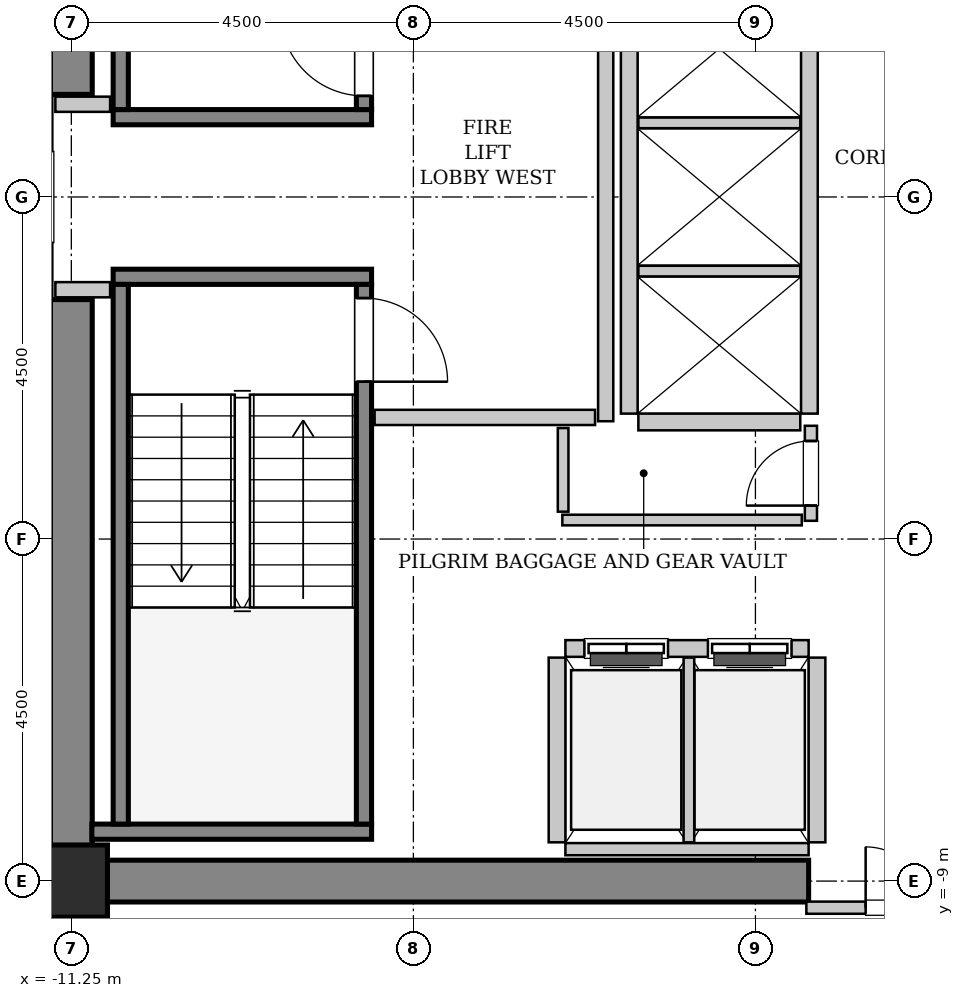
"""IFC4 building model, lengths in metres.
Left out: names, types, materials, properties, quantities, classifications, styles, units other than length and angle.
Written with IfcOpenShell. Run it as: python <this file> out.ifc"""

import sys

from ifc_helpers import new_model, si_unit, direction, frame, frame_2d, origin, origin_2d, place, context, subcontext, project, spatial, rectangle, hollow_rectangle, extrude, source, transform, mapped, element, fill, save


model = new_model("IFC4")
c1 = context("Model", 3, precision=1e-05, world=origin(), true_north=direction((0.0, 1.0)))
c2 = subcontext(c1, "Body", "Model", "MODEL_VIEW")
j1 = project(units=[si_unit("LENGTHUNIT", "METRE"), si_unit("PLANEANGLEUNIT", "RADIAN")], contexts=[c1])
p1 = place(None, origin())
s1 = spatial("IfcSite", under=j1, at=p1, CompositionType="ELEMENT")
p2 = place(p1, origin())
s2 = spatial("IfcBuilding", under=s1, at=p2, CompositionType="ELEMENT")
p3 = place(p2, frame((0.0, 0.0, 164.0)))
s3 = spatial("IfcBuildingStorey", under=s2, at=p3, CompositionType="ELEMENT", Elevation=164.0)
m1 = source(origin(), c2, "Body", "SweptSolid", [
    extrude(rectangle(XDim=9.975, YDim=0.55, at=frame_2d((4.987, 0.0))), origin(), (0.0, 0.0, 1.0), 3.8),
])
p4 = place(p3, frame((-11.525, -9.0, 0.0), z_axis=(0.0, 0.0, 1.0), x_axis=(1.0, 0.0, 0.0)))
e1 = element("IfcWall", 1, at=p4, inside=s3, PredefinedType="SHEAR", context=c2, shape_type="MappedRepresentation", body=[
    mapped(m1, transform((0.0, 0.0, 0.0), x_axis=(1.0, 0.0, 0.0), y_axis=(0.0, 1.0, 0.0), z_axis=(0.0, 0.0, 1.0), scale=1.0)),
])
m2 = source(origin(), c2, "Body", "SweptSolid", [
    extrude(rectangle(XDim=7.375, YDim=0.55, at=frame_2d((3.688, 0.0))), origin(), (0.0, 0.0, 1.0), 3.8),
])
for number, where, z_axis, x_axis in (
    (2, (-11.25, -8.725, 0.0), (0.0, 0.0, 1.0), (0.0, 1.0, 0.0)),
    (3, (-11.25, 1.35, 0.0), (0.0, 0.0, 1.0), (0.0, 1.0, 0.0)),
):
    element("IfcWall", number, at=place(p3, frame(where, z_axis=z_axis, x_axis=x_axis)), inside=s3, PredefinedType="SHEAR", context=c2, shape_type="MappedRepresentation", body=[
        mapped(m2, transform((0.0, 0.0, 0.0), x_axis=(1.0, 0.0, 0.0), y_axis=(0.0, 1.0, 0.0), z_axis=(0.0, 0.0, 1.0), scale=1.0)),
    ])
m3 = source(origin(), c2, "Body", "SweptSolid", [
    extrude(hollow_rectangle(XDim=0.95, YDim=0.95, WallThickness=0.045, InnerFilletRadius=0.045, OuterFilletRadius=0.09, at=origin_2d()), origin(), (0.0, 0.0, 1.0), 3.8),
])
p5 = place(p3, frame((-11.25, -9.0, 0.0), z_axis=(0.0, 0.0, 1.0), x_axis=(1.0, 0.0, 0.0)))
e4 = element("IfcColumn", 4, at=p5, inside=s3, PredefinedType="COLUMN", context=c2, shape_type="MappedRepresentation", body=[
    mapped(m3, transform((0.0, 0.0, 0.0), x_axis=(1.0, 0.0, 0.0), y_axis=(0.0, 1.0, 0.0), z_axis=(0.0, 0.0, 1.0), scale=1.0)),
])
m4 = source(origin(), c2, "Body", "SweptSolid", [
    extrude(rectangle(XDim=3.4, YDim=0.2, at=frame_2d((1.7, 0.0))), origin(), (0.0, 0.0, 1.0), 3.8),
])
p6 = place(p3, frame((-7.3, 1.05, 0.0), z_axis=(0.0, 0.0, 1.0), x_axis=(-1.0, 0.0, 0.0)))
e5 = element("IfcWall", 5, at=p6, inside=s3, PredefinedType="SOLIDWALL", context=c2, shape_type="MappedRepresentation", body=[
    mapped(m4, transform((0.0, 0.0, 0.0), x_axis=(1.0, 0.0, 0.0), y_axis=(0.0, 1.0, 0.0), z_axis=(0.0, 0.0, 1.0), scale=1.0)),
])
m5 = source(origin(), c2, "Body", "SweptSolid", [
    extrude(rectangle(XDim=7.1, YDim=0.2, at=frame_2d((3.55, 0.0))), origin(), (0.0, 0.0, 1.0), 3.8),
])
p7 = place(p3, frame((-7.4, 1.15, 0.0), z_axis=(0.0, 0.0, 1.0), x_axis=(0.0, 1.0, 0.0)))
e6 = element("IfcWall", 6, at=p7, inside=s3, PredefinedType="SOLIDWALL", context=c2, shape_type="MappedRepresentation", body=[
    mapped(m5, transform((0.0, 0.0, 0.0), x_axis=(1.0, 0.0, 0.0), y_axis=(0.0, 1.0, 0.0), z_axis=(0.0, 0.0, 1.0), scale=1.0)),
])
p8 = place(p7, frame((0.18, 0.0, 0.0)))
e7 = element("IfcOpeningElement", 7, at=p8, cuts=e6, PredefinedType="OPENING", context=c2, shape_type="SweptSolid", body=[
    extrude(rectangle(XDim=1.1, YDim=2.15, at=frame_2d((0.55, 1.075))), frame((0.0, 0.11, 0.0), z_axis=(0.0, -1.0, 0.0), x_axis=(1.0, 0.0, 0.0)), (0.0, 0.0, 1.0), 0.22),
])
p9 = place(p3, frame((-10.6, 1.15, 0.0), z_axis=(0.0, 0.0, 1.0), x_axis=(0.0, 1.0, 0.0)))
e8 = element("IfcWall", 8, at=p9, inside=s3, PredefinedType="SOLIDWALL", context=c2, shape_type="MappedRepresentation", body=[
    mapped(m5, transform((0.0, 0.0, 0.0), x_axis=(1.0, 0.0, 0.0), y_axis=(0.0, 1.0, 0.0), z_axis=(0.0, 0.0, 1.0), scale=1.0)),
])
p10 = place(p3, frame((-10.7, -1.05, 0.0), z_axis=(0.0, 0.0, 1.0), x_axis=(1.0, 0.0, 0.0)))
e9 = element("IfcWall", 9, at=p10, inside=s3, PredefinedType="SOLIDWALL", context=c2, shape_type="MappedRepresentation", body=[
    mapped(m4, transform((0.0, 0.0, 0.0), x_axis=(1.0, 0.0, 0.0), y_axis=(0.0, 1.0, 0.0), z_axis=(0.0, 0.0, 1.0), scale=1.0)),
])
m6 = source(origin(), c2, "Body", "SweptSolid", [
    extrude(rectangle(XDim=3.68, YDim=0.2, at=frame_2d((1.84, 0.0))), origin(), (0.0, 0.0, 1.0), 3.8),
])
p11 = place(p3, frame((-10.98, -8.35, 0.0), z_axis=(0.0, 0.0, 1.0), x_axis=(1.0, 0.0, 0.0)))
e10 = element("IfcWall", 10, at=p11, inside=s3, PredefinedType="SOLIDWALL", context=c2, shape_type="MappedRepresentation", body=[
    mapped(m6, transform((0.0, 0.0, 0.0), x_axis=(1.0, 0.0, 0.0), y_axis=(0.0, 1.0, 0.0), z_axis=(0.0, 0.0, 1.0), scale=1.0)),
])
p12 = place(p3, frame((-10.6, -1.15, 0.0), z_axis=(0.0, 0.0, 1.0), x_axis=(0.0, -1.0, 0.0)))
e11 = element("IfcWall", 11, at=p12, inside=s3, PredefinedType="SOLIDWALL", context=c2, shape_type="MappedRepresentation", body=[
    mapped(m5, transform((0.0, 0.0, 0.0), x_axis=(1.0, 0.0, 0.0), y_axis=(0.0, 1.0, 0.0), z_axis=(0.0, 0.0, 1.0), scale=1.0)),
])
p13 = place(p3, frame((-7.4, -1.15, 0.0), z_axis=(0.0, 0.0, 1.0), x_axis=(0.0, -1.0, 0.0)))
e12 = element("IfcWall", 12, at=p13, inside=s3, PredefinedType="SOLIDWALL", context=c2, shape_type="MappedRepresentation", body=[
    mapped(m5, transform((0.0, 0.0, 0.0), x_axis=(1.0, 0.0, 0.0), y_axis=(0.0, 1.0, 0.0), z_axis=(0.0, 0.0, 1.0), scale=1.0)),
])
p14 = place(p13, frame((0.18, 0.0, 0.0)))
e13 = element("IfcOpeningElement", 13, at=p14, cuts=e12, PredefinedType="OPENING", context=c2, shape_type="SweptSolid", body=[
    extrude(rectangle(XDim=1.1, YDim=2.15, at=frame_2d((0.55, 1.075))), frame((0.0, 0.11, 0.0), z_axis=(0.0, -1.0, 0.0), x_axis=(1.0, 0.0, 0.0)), (0.0, 0.0, 1.0), 0.22),
])
m7 = source(origin(), c2, "Body", "SweptSolid", [
    extrude(rectangle(XDim=3.2, YDim=0.22, at=frame_2d((1.6, 0.0))), origin(), (0.0, 0.0, 1.0), 3.535),
])
p15 = place(p3, frame((-1.55, -5.94, 0.0), z_axis=(0.0, 0.0, 1.0), x_axis=(-1.0, 0.0, 0.0)))
e14 = element("IfcWall", 14, at=p15, inside=s3, PredefinedType="SOLIDWALL", context=c2, shape_type="MappedRepresentation", body=[
    mapped(m7, transform((0.0, 0.0, 0.0), x_axis=(1.0, 0.0, 0.0), y_axis=(0.0, 1.0, 0.0), z_axis=(0.0, 0.0, 1.0), scale=1.0)),
])
p16 = place(p15, frame((1.85, 0.0, 0.0)))
e15 = element("IfcOpeningElement", 15, at=p16, cuts=e14, PredefinedType="OPENING", context=c2, shape_type="SweptSolid", body=[
    extrude(rectangle(XDim=1.1, YDim=2.2, at=frame_2d((0.55, 1.1))), frame((0.0, 0.12, 0.0), z_axis=(0.0, -1.0, 0.0), x_axis=(1.0, 0.0, 0.0)), (0.0, 0.0, 1.0), 0.24),
])
p17 = place(p15, frame((0.225, 0.0, 0.0)))
e16 = element("IfcOpeningElement", 16, at=p17, cuts=e14, PredefinedType="OPENING", context=c2, shape_type="SweptSolid", body=[
    extrude(rectangle(XDim=1.1, YDim=2.2, at=frame_2d((0.55, 1.1))), frame((0.0, 0.12, 0.0), z_axis=(0.0, -1.0, 0.0), x_axis=(1.0, 0.0, 0.0)), (0.0, 0.0, 1.0), 0.24),
])
m8 = source(origin(), c2, "Body", "SweptSolid", [
    extrude(rectangle(XDim=3.2, YDim=0.16, at=frame_2d((1.6, 0.0))), origin(), (0.0, 0.0, 1.0), 2.425),
])
p18 = place(p3, frame((-4.75, -8.58, 0.0), z_axis=(0.0, 0.0, 1.0), x_axis=(1.0, 0.0, 0.0)))
e17 = element("IfcWall", 17, at=p18, inside=s3, PredefinedType="PARTITIONING", context=c2, shape_type="MappedRepresentation", body=[
    mapped(m8, transform((0.0, 0.0, 0.0), x_axis=(1.0, 0.0, 0.0), y_axis=(0.0, 1.0, 0.0), z_axis=(0.0, 0.0, 1.0), scale=1.0)),
])
m9 = source(origin(), c2, "Body", "SweptSolid", [
    extrude(rectangle(XDim=2.43, YDim=0.22, at=frame_2d((1.215, 0.0))), origin(), (0.0, 0.0, 1.0), 3.535),
])
p19 = place(p3, frame((-4.86, -6.06, 0.0), z_axis=(0.0, 0.0, 1.0), x_axis=(0.0, -1.0, 0.0)))
e18 = element("IfcWall", 18, at=p19, inside=s3, PredefinedType="SOLIDWALL", context=c2, shape_type="MappedRepresentation", body=[
    mapped(m9, transform((0.0, 0.0, 0.0), x_axis=(1.0, 0.0, 0.0), y_axis=(0.0, 1.0, 0.0), z_axis=(0.0, 0.0, 1.0), scale=1.0)),
])
m10 = source(origin(), c2, "Body", "SweptSolid", [
    extrude(rectangle(XDim=2.43, YDim=0.14, at=frame_2d((1.215, 0.0))), origin(), (0.0, 0.0, 1.0), 3.535),
])
p20 = place(p3, frame((-3.125, -8.49, 0.0), z_axis=(0.0, 0.0, 1.0), x_axis=(0.0, 1.0, 0.0)))
e19 = element("IfcWall", 19, at=p20, inside=s3, PredefinedType="PARTITIONING", context=c2, shape_type="MappedRepresentation", body=[
    mapped(m10, transform((0.0, 0.0, 0.0), x_axis=(1.0, 0.0, 0.0), y_axis=(0.0, 1.0, 0.0), z_axis=(0.0, 0.0, 1.0), scale=1.0)),
])
p21 = place(p3, frame((-1.44, -8.49, 0.0), z_axis=(0.0, 0.0, 1.0), x_axis=(0.0, 1.0, 0.0)))
e20 = element("IfcWall", 20, at=p21, inside=s3, PredefinedType="SOLIDWALL", context=c2, shape_type="MappedRepresentation", body=[
    mapped(m9, transform((0.0, 0.0, 0.0), x_axis=(1.0, 0.0, 0.0), y_axis=(0.0, 1.0, 0.0), z_axis=(0.0, 0.0, 1.0), scale=1.0)),
])
m11 = source(origin(), c2, "Body", "SweptSolid", [
    extrude(rectangle(XDim=5.7, YDim=0.22, at=frame_2d((2.85, 0.0))), origin(), (0.0, 0.0, 1.0), 3.535),
])
for number, where, z_axis, x_axis in (
    (21, (-1.54, -2.85, 0.0), (0.0, 0.0, 1.0), (0.0, 1.0, 0.0)),
    (22, (-3.91, 2.85, 0.0), (0.0, 0.0, 1.0), (0.0, -1.0, 0.0)),
):
    element("IfcWall", number, at=place(p3, frame(where, z_axis=z_axis, x_axis=x_axis)), inside=s3, PredefinedType="SOLIDWALL", context=c2, shape_type="MappedRepresentation", body=[
        mapped(m11, transform((0.0, 0.0, 0.0), x_axis=(1.0, 0.0, 0.0), y_axis=(0.0, 1.0, 0.0), z_axis=(0.0, 0.0, 1.0), scale=1.0)),
    ])
m12 = source(origin(), c2, "Body", "SweptSolid", [
    extrude(rectangle(XDim=2.13, YDim=0.22, at=frame_2d((1.065, 0.0))), origin(), (0.0, 0.0, 1.0), 3.535),
])
p22 = place(p3, frame((-3.79, -2.96, 0.0), z_axis=(0.0, 0.0, 1.0), x_axis=(1.0, 0.0, 0.0)))
e23 = element("IfcWall", 23, at=p22, inside=s3, PredefinedType="SOLIDWALL", context=c2, shape_type="MappedRepresentation", body=[
    mapped(m12, transform((0.0, 0.0, 0.0), x_axis=(1.0, 0.0, 0.0), y_axis=(0.0, 1.0, 0.0), z_axis=(0.0, 0.0, 1.0), scale=1.0)),
])
m13 = source(origin(), c2, "Body", "SweptSolid", [
    extrude(rectangle(XDim=2.13, YDim=0.14, at=frame_2d((1.065, 0.0))), origin(), (0.0, 0.0, 1.0), 3.535),
])
for number, where, z_axis, x_axis in (
    (24, (-3.79, -0.975, 0.0), (0.0, 0.0, 1.0), (1.0, 0.0, 0.0)),
    (25, (-3.79, 0.975, 0.0), (0.0, 0.0, 1.0), (1.0, 0.0, 0.0)),
):
    element("IfcWall", number, at=place(p3, frame(where, z_axis=z_axis, x_axis=x_axis)), inside=s3, PredefinedType="PARTITIONING", context=c2, shape_type="MappedRepresentation", body=[
        mapped(m13, transform((0.0, 0.0, 0.0), x_axis=(1.0, 0.0, 0.0), y_axis=(0.0, 1.0, 0.0), z_axis=(0.0, 0.0, 1.0), scale=1.0)),
    ])
m14 = source(origin(), c2, "Body", "SweptSolid", [
    extrude(rectangle(XDim=5.9, YDim=0.2, at=frame_2d((2.95, 0.0))), origin(), (0.0, 0.0, 1.0), 3.535),
])
p23 = place(p3, frame((-4.22, -2.95, 0.0), z_axis=(0.0, 0.0, 1.0), x_axis=(0.0, 1.0, 0.0)))
e26 = element("IfcWall", 26, at=p23, inside=s3, PredefinedType="PARTITIONING", context=c2, shape_type="MappedRepresentation", body=[
    mapped(m14, transform((0.0, 0.0, 0.0), x_axis=(1.0, 0.0, 0.0), y_axis=(0.0, 1.0, 0.0), z_axis=(0.0, 0.0, 1.0), scale=1.0)),
])
m15 = source(origin(), c2, "Body", "SweptSolid", [
    extrude(rectangle(XDim=2.9, YDim=0.2, at=frame_2d((1.45, 0.0))), origin(), (0.0, 0.0, 1.0), 3.535),
])
p24 = place(p3, frame((-7.26, -2.9, 0.0), z_axis=(0.0, 0.0, 1.0), x_axis=(1.0, 0.0, 0.0)))
e27 = element("IfcWall", 27, at=p24, inside=s3, PredefinedType="PARTITIONING", context=c2, shape_type="MappedRepresentation", body=[
    mapped(m15, transform((0.0, 0.0, 0.0), x_axis=(1.0, 0.0, 0.0), y_axis=(0.0, 1.0, 0.0), z_axis=(0.0, 0.0, 1.0), scale=1.0)),
])
m16 = source(origin(), c2, "Body", "SweptSolid", [
    extrude(rectangle(XDim=0.72, YDim=0.2, at=frame_2d((0.36, 0.0))), origin(), (0.0, 0.0, 1.0), 3.535),
])
for number, where, z_axis, x_axis in (
    (28, (-11.46, 1.22, 0.0), (0.0, 0.0, 1.0), (1.0, 0.0, 0.0)),
    (29, (-11.46, -1.22, 0.0), (0.0, 0.0, 1.0), (1.0, 0.0, 0.0)),
):
    element("IfcWall", number, at=place(p3, frame(where, z_axis=z_axis, x_axis=x_axis)), inside=s3, PredefinedType="PARTITIONING", context=c2, shape_type="MappedRepresentation", body=[
        mapped(m16, transform((0.0, 0.0, 0.0), x_axis=(1.0, 0.0, 0.0), y_axis=(0.0, 1.0, 0.0), z_axis=(0.0, 0.0, 1.0), scale=1.0)),
    ])
m17 = source(origin(), c2, "Body", "SweptSolid", [
    extrude(rectangle(XDim=3.16, YDim=0.16, at=frame_2d((1.58, 0.0))), origin(), (0.0, 0.0, 1.0), 2.425),
])
p25 = place(p3, frame((-1.58, -9.35, 0.0), z_axis=(0.0, 0.0, 1.0), x_axis=(1.0, 0.0, 0.0)))
e30 = element("IfcWall", 30, at=p25, inside=s3, PredefinedType="PARTITIONING", context=c2, shape_type="MappedRepresentation", body=[
    mapped(m17, transform((0.0, 0.0, 0.0), x_axis=(1.0, 0.0, 0.0), y_axis=(0.0, 1.0, 0.0), z_axis=(0.0, 0.0, 1.0), scale=1.0)),
])
p26 = place(p25, frame((0.78, 0.0, 0.0)))
e31 = element("IfcOpeningElement", 31, at=p26, cuts=e30, PredefinedType="OPENING", context=c2, shape_type="SweptSolid", body=[
    extrude(rectangle(XDim=1.6, YDim=2.3, at=frame_2d((0.8, 1.15))), frame((0.0, 0.09, 0.0), z_axis=(0.0, -1.0, 0.0), x_axis=(1.0, 0.0, 0.0)), (0.0, 0.0, 1.0), 0.18),
])
m18 = source(origin(), c2, "Body", "SweptSolid", [
    extrude(rectangle(XDim=1.25, YDim=0.16, at=frame_2d((0.625, 0.0))), origin(), (0.0, 0.0, 1.0), 3.535),
])
p27 = place(p3, frame((-1.52, -4.26, 0.0), z_axis=(0.0, 0.0, 1.0), x_axis=(0.0, 1.0, 0.0)))
e32 = element("IfcWall", 32, at=p27, inside=s3, PredefinedType="PARTITIONING", context=c2, shape_type="MappedRepresentation", body=[
    mapped(m18, transform((0.0, 0.0, 0.0), x_axis=(1.0, 0.0, 0.0), y_axis=(0.0, 1.0, 0.0), z_axis=(0.0, 0.0, 1.0), scale=1.0)),
])
p28 = place(p27, frame((0.2, 0.0, 0.0)))
e33 = element("IfcOpeningElement", 33, at=p28, cuts=e32, PredefinedType="OPENING", context=c2, shape_type="SweptSolid", body=[
    extrude(rectangle(XDim=0.85, YDim=2.1, at=frame_2d((0.425, 1.05))), frame((0.0, 0.09, 0.0), z_axis=(0.0, -1.0, 0.0), x_axis=(1.0, 0.0, 0.0)), (0.0, 0.0, 1.0), 0.18),
])
m19 = source(origin(), c2, "Body", "SweptSolid", [
    extrude(rectangle(XDim=3.15, YDim=0.14, at=frame_2d((1.575, 0.0))), origin(), (0.0, 0.0, 1.0), 3.535),
])
p29 = place(p3, frame((-4.79, -4.25, 0.0), z_axis=(0.0, 0.0, 1.0), x_axis=(1.0, 0.0, 0.0)))
e34 = element("IfcWall", 34, at=p29, inside=s3, PredefinedType="PARTITIONING", context=c2, shape_type="MappedRepresentation", body=[
    mapped(m19, transform((0.0, 0.0, 0.0), x_axis=(1.0, 0.0, 0.0), y_axis=(0.0, 1.0, 0.0), z_axis=(0.0, 0.0, 1.0), scale=1.0)),
])
m20 = source(origin(), c2, "Body", "SweptSolid", [
    extrude(rectangle(XDim=1.1, YDim=0.14, at=frame_2d((0.55, 0.0))), origin(), (0.0, 0.0, 1.0), 3.535),
])
p30 = place(p3, frame((-4.78, -4.14, 0.0), z_axis=(0.0, 0.0, 1.0), x_axis=(0.0, 1.0, 0.0)))
e35 = element("IfcWall", 35, at=p30, inside=s3, PredefinedType="PARTITIONING", context=c2, shape_type="MappedRepresentation", body=[
    mapped(m20, transform((0.0, 0.0, 0.0), x_axis=(1.0, 0.0, 0.0), y_axis=(0.0, 1.0, 0.0), z_axis=(0.0, 0.0, 1.0), scale=1.0)),
])
m21 = source(origin(), c2, "Body", "SweptSolid", [
    extrude(rectangle(XDim=1.1, YDim=2.15, at=frame_2d((0.55, 1.075))), frame((0.0, 0.025, 0.0), z_axis=(0.0, -1.0, 0.0), x_axis=(1.0, 0.0, 0.0)), (0.0, 0.0, 1.0), 0.05),
])
p31 = place(p8, origin())
e36 = element("IfcDoor", 36, at=p31, inside=s3, OperationType="SINGLE_SWING_RIGHT", PredefinedType="DOOR", context=c2, shape_type="MappedRepresentation", body=[
    mapped(m21, transform((0.0, 0.0, 0.0), x_axis=(1.0, 0.0, 0.0), y_axis=(0.0, 1.0, 0.0), z_axis=(0.0, 0.0, 1.0), scale=1.0)),
])
fill(e7, e36)
p32 = place(p14, origin())
e37 = element("IfcDoor", 37, at=p32, inside=s3, OperationType="SINGLE_SWING_RIGHT", PredefinedType="DOOR", context=c2, shape_type="MappedRepresentation", body=[
    mapped(m21, transform((0.0, 0.0, 0.0), x_axis=(1.0, 0.0, 0.0), y_axis=(0.0, 1.0, 0.0), z_axis=(0.0, 0.0, 1.0), scale=1.0)),
])
fill(e13, e37)
m22 = source(origin(), c2, "Body", "SweptSolid", [
    extrude(rectangle(XDim=1.1, YDim=2.2, at=frame_2d((0.55, 1.1))), frame((0.0, 0.025, 0.0), z_axis=(0.0, -1.0, 0.0), x_axis=(1.0, 0.0, 0.0)), (0.0, 0.0, 1.0), 0.05),
])
p33 = place(p16, origin())
e38 = element("IfcDoor", 38, at=p33, inside=s3, OperationType="DOUBLE_DOOR_SLIDING", PredefinedType="DOOR", context=c2, shape_type="MappedRepresentation", body=[
    mapped(m22, transform((0.0, 0.0, 0.0), x_axis=(1.0, 0.0, 0.0), y_axis=(0.0, 1.0, 0.0), z_axis=(0.0, 0.0, 1.0), scale=1.0)),
])
fill(e15, e38)
p34 = place(p17, origin())
e39 = element("IfcDoor", 39, at=p34, inside=s3, OperationType="DOUBLE_DOOR_SLIDING", PredefinedType="DOOR", context=c2, shape_type="MappedRepresentation", body=[
    mapped(m22, transform((0.0, 0.0, 0.0), x_axis=(1.0, 0.0, 0.0), y_axis=(0.0, 1.0, 0.0), z_axis=(0.0, 0.0, 1.0), scale=1.0)),
])
fill(e16, e39)
m23 = source(origin(), c2, "Body", "SweptSolid", [
    extrude(rectangle(XDim=1.6, YDim=2.3, at=frame_2d((0.8, 1.15))), frame((0.0, 0.025, 0.0), z_axis=(0.0, -1.0, 0.0), x_axis=(1.0, 0.0, 0.0)), (0.0, 0.0, 1.0), 0.05),
])
p35 = place(p26, origin())
e40 = element("IfcDoor", 40, at=p35, inside=s3, OperationType="DOUBLE_DOOR_SINGLE_SWING", PredefinedType="DOOR", context=c2, shape_type="MappedRepresentation", body=[
    mapped(m23, transform((0.0, 0.0, 0.0), x_axis=(1.0, 0.0, 0.0), y_axis=(0.0, 1.0, 0.0), z_axis=(0.0, 0.0, 1.0), scale=1.0)),
])
fill(e31, e40)
m24 = source(origin(), c2, "Body", "SweptSolid", [
    extrude(rectangle(XDim=0.85, YDim=2.1, at=frame_2d((0.425, 1.05))), frame((0.0, 0.025, 0.0), z_axis=(0.0, -1.0, 0.0), x_axis=(1.0, 0.0, 0.0)), (0.0, 0.0, 1.0), 0.05),
])
p36 = place(p28, origin())
e41 = element("IfcDoor", 41, at=p36, inside=s3, OperationType="SINGLE_SWING_LEFT", PredefinedType="DOOR", context=c2, shape_type="MappedRepresentation", body=[
    mapped(m24, transform((0.0, 0.0, 0.0), x_axis=(1.0, 0.0, 0.0), y_axis=(0.0, 1.0, 0.0), z_axis=(0.0, 0.0, 1.0), scale=1.0)),
])
fill(e33, e41)
save(model, sys.argv[1])
